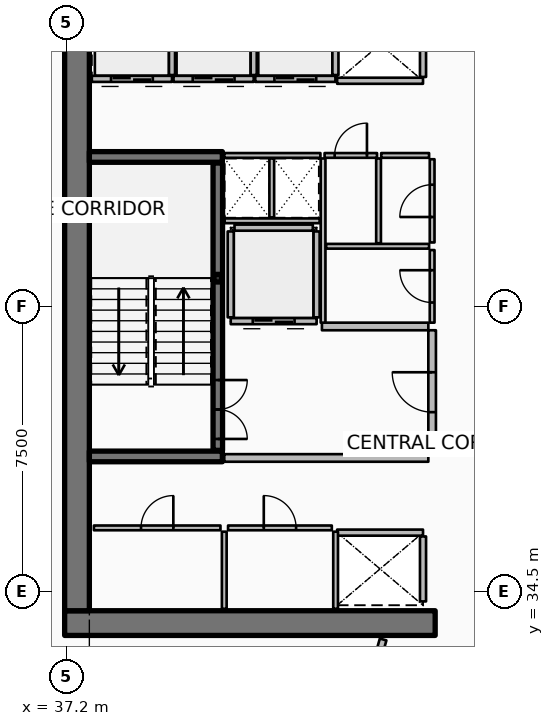
"""IFC4 building model, lengths in metres.
Left out: names, types, materials, properties, quantities, classifications, styles, units other than length and angle.
Written with IfcOpenShell. Run it as: python <this file> out.ifc"""

import sys

from ifc_helpers import new_model, si_unit, direction, frame, frame_2d, origin, origin_2d, place, context, subcontext, project, spatial, rectangle, hollow_rectangle, extrude, element, fill, save


model = new_model("IFC4")
c1 = context("Model", 3, precision=1e-05, world=origin(), true_north=direction((0.0, 1.0)))
c2 = subcontext(c1, "Body", "Model", "MODEL_VIEW")
j1 = project(units=[si_unit("LENGTHUNIT", "METRE"), si_unit("PLANEANGLEUNIT", "RADIAN")], contexts=[c1])
p1 = place(None, origin())
s1 = spatial("IfcSite", under=j1, at=p1, CompositionType="ELEMENT")
p2 = place(p1, origin())
s2 = spatial("IfcBuilding", under=s1, at=p2, CompositionType="ELEMENT")
p3 = place(p2, frame((0.0, 0.0, 180.3)))
s3 = spatial("IfcBuildingStorey", under=s2, at=p3, CompositionType="ELEMENT", Elevation=180.3)
p4 = place(p3, frame((37.15, 33.675, 0.0), z_axis=(0.0, 0.0, 1.0), x_axis=(1.0, 0.0, 0.0)))
e1 = element("IfcWall", 1, at=p4, inside=s3, PredefinedType="SHEAR", context=c2, shape_type="SweptSolid", body=[
    extrude(rectangle(XDim=9.75, YDim=0.65, at=frame_2d((4.875, 0.0))), origin(), (0.0, 0.0, 1.0), 3.75),
])
p5 = place(p3, frame((37.475, 34.0, 0.0), z_axis=(0.0, 0.0, 1.0), x_axis=(0.0, 1.0, 0.0)))
e2 = element("IfcWall", 2, at=p5, inside=s3, PredefinedType="SHEAR", context=c2, shape_type="SweptSolid", body=[
    extrude(rectangle(XDim=16.0, YDim=0.65, at=frame_2d((8.0, 0.0))), origin(), (0.0, 0.0, 1.0), 3.75),
])
for number, where, z_axis, x_axis in (
    (3, (37.8, 38.06, 0.0), (0.0, 0.0, 1.0), (1.0, 0.0, 0.0)),
    (4, (37.8, 45.94, 0.0), (0.0, 0.0, 1.0), (1.0, 0.0, 0.0)),
):
    element("IfcWall", number, at=place(p3, frame(where, z_axis=z_axis, x_axis=x_axis)), inside=s3, PredefinedType="SHEAR", context=c2, shape_type="SweptSolid", body=[
        extrude(rectangle(XDim=3.5, YDim=0.28, at=frame_2d((1.75, 0.0))), origin(), (0.0, 0.0, 1.0), 3.75),
    ])
p6 = place(p3, frame((41.18, 42.75, 0.0), z_axis=(0.0, 0.0, 1.0), x_axis=(1.0, 0.0, 0.0)))
e5 = element("IfcColumn", 5, at=p6, inside=s3, PredefinedType="COLUMN", context=c2, shape_type="SweptSolid", body=[
    extrude(hollow_rectangle(XDim=0.2, YDim=0.2, WallThickness=0.01, InnerFilletRadius=0.01, OuterFilletRadius=0.02, at=origin_2d()), origin(), (0.0, 0.0, 1.0), 1.67),
])
p7 = place(p3, frame((41.18, 38.22, 0.0), z_axis=(0.0, 0.0, 1.0), x_axis=(0.0, 1.0, 0.0)))
e6 = element("IfcWall", 6, at=p7, inside=s3, PredefinedType="SOLIDWALL", context=c2, shape_type="SweptSolid", body=[
    extrude(rectangle(XDim=7.56, YDim=0.25, at=frame_2d((3.78, 0.0))), origin(), (0.0, 0.0, 1.0), 3.5),
])
p8 = place(p7, frame((0.3, 0.0, 0.0)))
e7 = element("IfcOpeningElement", 7, at=p8, cuts=e6, PredefinedType="OPENING", context=c2, shape_type="SweptSolid", body=[
    extrude(rectangle(XDim=1.55, YDim=2.15, at=frame_2d((0.775, 1.075))), frame((0.0, 0.135, 0.0), z_axis=(0.0, -1.0, 0.0), x_axis=(1.0, 0.0, 0.0)), (0.0, 0.0, 1.0), 0.27),
])
p9 = place(p3, frame((39.975, 47.995, 0.0), z_axis=(0.0, 0.0, 1.0), x_axis=(-1.0, 0.0, 0.0)))
e8 = element("IfcWall", 8, at=p9, inside=s3, PredefinedType="PARTITIONING", context=c2, shape_type="SweptSolid", body=[
    extrude(rectangle(XDim=2.11, YDim=0.16, at=frame_2d((1.055, 0.0))), origin(), (0.0, 0.0, 1.0), 3.5),
])
p10 = place(p9, frame((0.505, 0.0, 0.0)))
e9 = element("IfcOpeningElement", 9, at=p10, cuts=e8, PredefinedType="OPENING", context=c2, shape_type="SweptSolid", body=[
    extrude(rectangle(XDim=1.1, YDim=2.1, at=frame_2d((0.55, 1.05))), frame((0.0, 0.09, 0.0), z_axis=(0.0, -1.0, 0.0), x_axis=(1.0, 0.0, 0.0)), (0.0, 0.0, 1.0), 0.18),
])
p11 = place(p3, frame((39.975, 48.095, 0.0), z_axis=(0.0, 0.0, 1.0), x_axis=(0.0, 1.0, 0.0)))
e10 = element("IfcWall", 10, at=p11, inside=s3, PredefinedType="PARTITIONING", context=c2, shape_type="SweptSolid", body=[
    extrude(rectangle(XDim=1.61, YDim=0.16, at=frame_2d((0.805, 0.0))), origin(), (0.0, 0.0, 1.0), 3.5),
])
p12 = place(p3, frame((42.125, 47.995, 0.0), z_axis=(0.0, 0.0, 1.0), x_axis=(-1.0, 0.0, 0.0)))
e11 = element("IfcWall", 11, at=p12, inside=s3, PredefinedType="PARTITIONING", context=c2, shape_type="SweptSolid", body=[
    extrude(rectangle(XDim=2.11, YDim=0.16, at=frame_2d((1.055, 0.0))), origin(), (0.0, 0.0, 1.0), 3.5),
])
p13 = place(p12, frame((0.505, 0.0, 0.0)))
e12 = element("IfcOpeningElement", 12, at=p13, cuts=e11, PredefinedType="OPENING", context=c2, shape_type="SweptSolid", body=[
    extrude(rectangle(XDim=1.1, YDim=2.1, at=frame_2d((0.55, 1.05))), frame((0.0, 0.09, 0.0), z_axis=(0.0, -1.0, 0.0), x_axis=(1.0, 0.0, 0.0)), (0.0, 0.0, 1.0), 0.18),
])
p14 = place(p3, frame((42.125, 48.095, 0.0), z_axis=(0.0, 0.0, 1.0), x_axis=(0.0, 1.0, 0.0)))
e13 = element("IfcWall", 13, at=p14, inside=s3, PredefinedType="PARTITIONING", context=c2, shape_type="SweptSolid", body=[
    extrude(rectangle(XDim=1.61, YDim=0.16, at=frame_2d((0.805, 0.0))), origin(), (0.0, 0.0, 1.0), 3.5),
])
p15 = place(p3, frame((44.275, 47.995, 0.0), z_axis=(0.0, 0.0, 1.0), x_axis=(-1.0, 0.0, 0.0)))
e14 = element("IfcWall", 14, at=p15, inside=s3, PredefinedType="PARTITIONING", context=c2, shape_type="SweptSolid", body=[
    extrude(rectangle(XDim=2.11, YDim=0.16, at=frame_2d((1.055, 0.0))), origin(), (0.0, 0.0, 1.0), 3.5),
])
p16 = place(p15, frame((0.505, 0.0, 0.0)))
e15 = element("IfcOpeningElement", 15, at=p16, cuts=e14, PredefinedType="OPENING", context=c2, shape_type="SweptSolid", body=[
    extrude(rectangle(XDim=1.1, YDim=2.1, at=frame_2d((0.55, 1.05))), frame((0.0, 0.09, 0.0), z_axis=(0.0, -1.0, 0.0), x_axis=(1.0, 0.0, 0.0)), (0.0, 0.0, 1.0), 0.18),
])
p17 = place(p3, frame((44.275, 48.095, 0.0), z_axis=(0.0, 0.0, 1.0), x_axis=(0.0, 1.0, 0.0)))
e16 = element("IfcWall", 16, at=p17, inside=s3, PredefinedType="PARTITIONING", context=c2, shape_type="SweptSolid", body=[
    extrude(rectangle(XDim=1.61, YDim=0.16, at=frame_2d((0.805, 0.0))), origin(), (0.0, 0.0, 1.0), 3.5),
])
p18 = place(p3, frame((46.58, 47.945, 0.0), z_axis=(0.0, 0.0, 1.0), x_axis=(-1.0, 0.0, 0.0)))
e17 = element("IfcWall", 17, at=p18, inside=s3, PredefinedType="PARTITIONING", context=c2, shape_type="SweptSolid", body=[
    extrude(rectangle(XDim=2.26, YDim=0.16, at=frame_2d((1.13, 0.0))), origin(), (0.0, 0.0, 1.0), 3.5),
])
p19 = place(p3, frame((46.58, 48.045, 0.0), z_axis=(0.0, 0.0, 1.0), x_axis=(0.0, 1.0, 0.0)))
e18 = element("IfcWall", 18, at=p19, inside=s3, PredefinedType="PARTITIONING", context=c2, shape_type="SweptSolid", body=[
    extrude(rectangle(XDim=1.71, YDim=0.16, at=frame_2d((0.855, 0.0))), origin(), (0.0, 0.0, 1.0), 3.5),
])
p20 = place(p3, frame((44.32, 36.055, 0.0), z_axis=(0.0, 0.0, 1.0), x_axis=(1.0, 0.0, 0.0)))
e19 = element("IfcWall", 19, at=p20, inside=s3, PredefinedType="PARTITIONING", context=c2, shape_type="SweptSolid", body=[
    extrude(rectangle(XDim=2.26, YDim=0.16, at=frame_2d((1.13, 0.0))), origin(), (0.0, 0.0, 1.0), 3.5),
])
p21 = place(p3, frame((46.58, 34.245, 0.0), z_axis=(0.0, 0.0, 1.0), x_axis=(0.0, 1.0, 0.0)))
e20 = element("IfcWall", 20, at=p21, inside=s3, PredefinedType="PARTITIONING", context=c2, shape_type="SweptSolid", body=[
    extrude(rectangle(XDim=1.71, YDim=0.16, at=frame_2d((0.855, 0.0))), origin(), (0.0, 0.0, 1.0), 3.5),
])
p22 = place(p3, frame((43.78, 41.62, 0.0), z_axis=(0.0, 0.0, 1.0), x_axis=(-1.0, 0.0, 0.0)))
e21 = element("IfcWall", 21, at=p22, inside=s3, PredefinedType="PARTITIONING", context=c2, shape_type="SweptSolid", body=[
    extrude(rectangle(XDim=2.26, YDim=0.16, at=frame_2d((1.13, 0.0))), origin(), (0.0, 0.0, 1.0), 3.5),
])
p23 = place(p22, frame((0.58, 0.0, 0.0)))
e22 = element("IfcOpeningElement", 22, at=p23, cuts=e21, PredefinedType="OPENING", context=c2, shape_type="SweptSolid", body=[
    extrude(rectangle(XDim=1.1, YDim=2.1, at=frame_2d((0.55, 1.05))), frame((0.0, 0.09, 0.0), z_axis=(0.0, -1.0, 0.0), x_axis=(1.0, 0.0, 0.0)), (0.0, 0.0, 1.0), 0.18),
])
for number, where, z_axis, x_axis in (
    (23, (43.78, 41.72, 0.0), (0.0, 0.0, 1.0), (0.0, 1.0, 0.0)),
    (24, (41.52, 41.72, 0.0), (0.0, 0.0, 1.0), (0.0, 1.0, 0.0)),
):
    element("IfcWall", number, at=place(p3, frame(where, z_axis=z_axis, x_axis=x_axis)), inside=s3, PredefinedType="PARTITIONING", context=c2, shape_type="SweptSolid", body=[
        extrude(rectangle(XDim=2.26, YDim=0.16, at=frame_2d((1.13, 0.0))), origin(), (0.0, 0.0, 1.0), 3.5),
    ])
p24 = place(p3, frame((41.62, 44.08, 0.0), z_axis=(0.0, 0.0, 1.0), x_axis=(1.0, 0.0, 0.0)))
e25 = element("IfcWall", 25, at=p24, inside=s3, PredefinedType="PARTITIONING", context=c2, shape_type="SweptSolid", body=[
    extrude(rectangle(XDim=2.06, YDim=0.16, at=frame_2d((1.03, 0.0))), origin(), (0.0, 0.0, 1.0), 3.5),
])
for number, where, z_axis, x_axis in (
    (26, (44.28, 34.05, 0.0), (0.0, 0.0, 1.0), (0.0, 1.0, 0.0)),
    (27, (41.35, 34.05, 0.0), (0.0, 0.0, 1.0), (0.0, 1.0, 0.0)),
):
    element("IfcWall", number, at=place(p3, frame(where, z_axis=z_axis, x_axis=x_axis)), inside=s3, PredefinedType="PARTITIONING", context=c2, shape_type="SweptSolid", body=[
        extrude(rectangle(XDim=2.03, YDim=0.125, at=frame_2d((1.015, 0.0))), origin(), (0.0, 0.0, 1.0), 2.94),
    ])
p25 = place(p3, frame((37.92, 36.18, 0.0), z_axis=(0.0, 0.0, 1.0), x_axis=(1.0, 0.0, 0.0)))
e28 = element("IfcWall", 28, at=p25, inside=s3, PredefinedType="PARTITIONING", context=c2, shape_type="SweptSolid", body=[
    extrude(rectangle(XDim=3.33, YDim=0.125, at=frame_2d((1.665, 0.0))), origin(), (0.0, 0.0, 1.0), 2.94),
])
p26 = place(p25, frame((1.24, 0.0, 0.0)))
e29 = element("IfcOpeningElement", 29, at=p26, cuts=e28, PredefinedType="OPENING", context=c2, shape_type="SweptSolid", body=[
    extrude(rectangle(XDim=0.85, YDim=2.06, at=frame_2d((0.425, 1.03))), frame((0.0, 0.073, 0.0), z_axis=(0.0, -1.0, 0.0), x_axis=(1.0, 0.0, 0.0)), (0.0, 0.0, 1.0), 0.145),
])
p27 = place(p3, frame((41.45, 36.18, 0.0), z_axis=(0.0, 0.0, 1.0), x_axis=(1.0, 0.0, 0.0)))
e30 = element("IfcWall", 30, at=p27, inside=s3, PredefinedType="PARTITIONING", context=c2, shape_type="SweptSolid", body=[
    extrude(rectangle(XDim=2.73, YDim=0.125, at=frame_2d((1.365, 0.0))), origin(), (0.0, 0.0, 1.0), 2.94),
])
p28 = place(p27, frame((0.94, 0.0, 0.0)))
e31 = element("IfcOpeningElement", 31, at=p28, cuts=e30, PredefinedType="OPENING", context=c2, shape_type="SweptSolid", body=[
    extrude(rectangle(XDim=0.85, YDim=2.06, at=frame_2d((0.425, 1.03))), frame((0.0, 0.073, 0.0), z_axis=(0.0, -1.0, 0.0), x_axis=(1.0, 0.0, 0.0)), (0.0, 0.0, 1.0), 0.145),
])
p29 = place(p3, frame((41.35, 38.02, 0.0), z_axis=(0.0, 0.0, 1.0), x_axis=(1.0, 0.0, 0.0)))
e32 = element("IfcWall", 32, at=p29, inside=s3, PredefinedType="PARTITIONING", context=c2, shape_type="SweptSolid", body=[
    extrude(rectangle(XDim=5.37, YDim=0.2, at=frame_2d((2.685, 0.0))), origin(), (0.0, 0.0, 1.0), 3.5),
])
p30 = place(p3, frame((43.92, 41.48, 0.0), z_axis=(0.0, 0.0, 1.0), x_axis=(1.0, 0.0, 0.0)))
e33 = element("IfcWall", 33, at=p30, inside=s3, PredefinedType="PARTITIONING", context=c2, shape_type="SweptSolid", body=[
    extrude(rectangle(XDim=2.8, YDim=0.2, at=frame_2d((1.4, 0.0))), origin(), (0.0, 0.0, 1.0), 3.5),
])
p31 = place(p3, frame((46.82, 38.12, 0.0), z_axis=(0.0, 0.0, 1.0), x_axis=(0.0, 1.0, 0.0)))
e34 = element("IfcWall", 34, at=p31, inside=s3, PredefinedType="PARTITIONING", context=c2, shape_type="SweptSolid", body=[
    extrude(rectangle(XDim=3.26, YDim=0.2, at=frame_2d((1.63, 0.0))), origin(), (0.0, 0.0, 1.0), 3.5),
])
p32 = place(p31, frame((1.105, 0.0, 0.0)))
e35 = element("IfcOpeningElement", 35, at=p32, cuts=e34, PredefinedType="OPENING", context=c2, shape_type="SweptSolid", body=[
    extrude(rectangle(XDim=1.05, YDim=2.1, at=frame_2d((0.525, 1.05))), frame((0.0, 0.11, 0.0), z_axis=(0.0, -1.0, 0.0), x_axis=(1.0, 0.0, 0.0)), (0.0, 0.0, 1.0), 0.22),
])
p33 = place(p3, frame((41.36, 44.26, 0.0), z_axis=(0.0, 0.0, 1.0), x_axis=(1.0, 0.0, 0.0)))
e36 = element("IfcWall", 36, at=p33, inside=s3, PredefinedType="PARTITIONING", context=c2, shape_type="SweptSolid", body=[
    extrude(rectangle(XDim=2.5, YDim=0.125, at=frame_2d((1.25, 0.0))), origin(), (0.0, 0.0, 1.0), 2.94),
])
p34 = place(p3, frame((42.6, 44.35, 0.0), z_axis=(0.0, 0.0, 1.0), x_axis=(0.0, 1.0, 0.0)))
e37 = element("IfcWall", 37, at=p34, inside=s3, PredefinedType="PARTITIONING", context=c2, shape_type="SweptSolid", body=[
    extrude(rectangle(XDim=1.55, YDim=0.125, at=frame_2d((0.775, 0.0))), origin(), (0.0, 0.0, 1.0), 2.94),
])
p35 = place(p3, frame((43.95, 41.58, 0.0), z_axis=(0.0, 0.0, 1.0), x_axis=(0.0, 1.0, 0.0)))
e38 = element("IfcWall", 38, at=p35, inside=s3, PredefinedType="PARTITIONING", context=c2, shape_type="SweptSolid", body=[
    extrude(rectangle(XDim=4.32, YDim=0.125, at=frame_2d((2.16, 0.0))), origin(), (0.0, 0.0, 1.0), 2.94),
])
p36 = place(p3, frame((44.03, 43.59, 0.0), z_axis=(0.0, 0.0, 1.0), x_axis=(1.0, 0.0, 0.0)))
e39 = element("IfcWall", 39, at=p36, inside=s3, PredefinedType="PARTITIONING", context=c2, shape_type="SweptSolid", body=[
    extrude(rectangle(XDim=2.71, YDim=0.125, at=frame_2d((1.355, 0.0))), origin(), (0.0, 0.0, 1.0), 2.94),
])
p37 = place(p3, frame((45.41, 43.67, 0.0), z_axis=(0.0, 0.0, 1.0), x_axis=(0.0, 1.0, 0.0)))
e40 = element("IfcWall", 40, at=p37, inside=s3, PredefinedType="PARTITIONING", context=c2, shape_type="SweptSolid", body=[
    extrude(rectangle(XDim=2.23, YDim=0.125, at=frame_2d((1.115, 0.0))), origin(), (0.0, 0.0, 1.0), 2.94),
])
p38 = place(p3, frame((46.82, 41.58, 0.0), z_axis=(0.0, 0.0, 1.0), x_axis=(0.0, 1.0, 0.0)))
e41 = element("IfcWall", 41, at=p38, inside=s3, PredefinedType="PARTITIONING", context=c2, shape_type="SweptSolid", body=[
    extrude(rectangle(XDim=1.91, YDim=0.125, at=frame_2d((0.955, 0.0))), origin(), (0.0, 0.0, 1.0), 2.94),
])
p39 = place(p38, frame((0.53, 0.0, 0.0)))
e42 = element("IfcOpeningElement", 42, at=p39, cuts=e41, PredefinedType="OPENING", context=c2, shape_type="SweptSolid", body=[
    extrude(rectangle(XDim=0.85, YDim=2.06, at=frame_2d((0.425, 1.03))), frame((0.0, 0.073, 0.0), z_axis=(0.0, -1.0, 0.0), x_axis=(1.0, 0.0, 0.0)), (0.0, 0.0, 1.0), 0.145),
])
p40 = place(p3, frame((46.82, 43.69, 0.0), z_axis=(0.0, 0.0, 1.0), x_axis=(0.0, 1.0, 0.0)))
e43 = element("IfcWall", 43, at=p40, inside=s3, PredefinedType="PARTITIONING", context=c2, shape_type="SweptSolid", body=[
    extrude(rectangle(XDim=2.19, YDim=0.125, at=frame_2d((1.095, 0.0))), origin(), (0.0, 0.0, 1.0), 2.94),
])
p41 = place(p40, frame((0.67, 0.0, 0.0)))
e44 = element("IfcOpeningElement", 44, at=p41, cuts=e43, PredefinedType="OPENING", context=c2, shape_type="SweptSolid", body=[
    extrude(rectangle(XDim=0.85, YDim=2.06, at=frame_2d((0.425, 1.03))), frame((0.0, 0.073, 0.0), z_axis=(0.0, -1.0, 0.0), x_axis=(1.0, 0.0, 0.0)), (0.0, 0.0, 1.0), 0.145),
])
p42 = place(p3, frame((41.35, 45.98, 0.0), z_axis=(0.0, 0.0, 1.0), x_axis=(1.0, 0.0, 0.0)))
e45 = element("IfcWall", 45, at=p42, inside=s3, PredefinedType="PARTITIONING", context=c2, shape_type="SweptSolid", body=[
    extrude(rectangle(XDim=2.53, YDim=0.125, at=frame_2d((1.265, 0.0))), origin(), (0.0, 0.0, 1.0), 2.94),
])
p43 = place(p3, frame((43.99, 45.98, 0.0), z_axis=(0.0, 0.0, 1.0), x_axis=(1.0, 0.0, 0.0)))
e46 = element("IfcWall", 46, at=p43, inside=s3, PredefinedType="PARTITIONING", context=c2, shape_type="SweptSolid", body=[
    extrude(rectangle(XDim=1.38, YDim=0.125, at=frame_2d((0.69, 0.0))), origin(), (0.0, 0.0, 1.0), 2.94),
])
p44 = place(p43, frame((0.265, 0.0, 0.0)))
e47 = element("IfcOpeningElement", 47, at=p44, cuts=e46, PredefinedType="OPENING", context=c2, shape_type="SweptSolid", body=[
    extrude(rectangle(XDim=0.85, YDim=2.06, at=frame_2d((0.425, 1.03))), frame((0.0, 0.073, 0.0), z_axis=(0.0, -1.0, 0.0), x_axis=(1.0, 0.0, 0.0)), (0.0, 0.0, 1.0), 0.145),
])
p45 = place(p3, frame((45.48, 45.98, 0.0), z_axis=(0.0, 0.0, 1.0), x_axis=(1.0, 0.0, 0.0)))
e48 = element("IfcWall", 48, at=p45, inside=s3, PredefinedType="PARTITIONING", context=c2, shape_type="SweptSolid", body=[
    extrude(rectangle(XDim=1.26, YDim=0.125, at=frame_2d((0.63, 0.0))), origin(), (0.0, 0.0, 1.0), 2.94),
])
p46 = place(p3, frame((45.531, 33.244, 0.0), z_axis=(0.0, 0.0, 1.0), x_axis=(-0.271437162306, -0.962456163635, 0.0)))
e49 = element("IfcWall", 49, at=p46, inside=s3, PredefinedType="PARTITIONING", context=c2, shape_type="SweptSolid", body=[
    extrude(rectangle(XDim=15.63, YDim=0.18, at=frame_2d((7.815, 0.0))), origin(), (0.0, 0.0, 1.0), 2.94),
])
p47 = place(p8, origin())
e50 = element("IfcDoor", 50, at=p47, inside=s3, OperationType="DOUBLE_DOOR_SINGLE_SWING", PredefinedType="DOOR", context=c2, shape_type="SweptSolid", body=[
    extrude(rectangle(XDim=1.55, YDim=2.15, at=frame_2d((0.775, 1.075))), frame((0.0, 0.025, 0.0), z_axis=(0.0, -1.0, 0.0), x_axis=(1.0, 0.0, 0.0)), (0.0, 0.0, 1.0), 0.05),
])
fill(e7, e50)
p48 = place(p10, origin())
e51 = element("IfcDoor", 51, at=p48, inside=s3, OperationType="DOUBLE_DOOR_SLIDING", PredefinedType="DOOR", context=c2, shape_type="SweptSolid", body=[
    extrude(rectangle(XDim=1.1, YDim=2.1, at=frame_2d((0.55, 1.05))), frame((0.0, 0.025, 0.0), z_axis=(0.0, -1.0, 0.0), x_axis=(1.0, 0.0, 0.0)), (0.0, 0.0, 1.0), 0.05),
])
fill(e9, e51)
p49 = place(p13, origin())
e52 = element("IfcDoor", 52, at=p49, inside=s3, OperationType="DOUBLE_DOOR_SLIDING", PredefinedType="DOOR", context=c2, shape_type="SweptSolid", body=[
    extrude(rectangle(XDim=1.1, YDim=2.1, at=frame_2d((0.55, 1.05))), frame((0.0, 0.025, 0.0), z_axis=(0.0, -1.0, 0.0), x_axis=(1.0, 0.0, 0.0)), (0.0, 0.0, 1.0), 0.05),
])
fill(e12, e52)
p50 = place(p16, origin())
e53 = element("IfcDoor", 53, at=p50, inside=s3, OperationType="DOUBLE_DOOR_SLIDING", PredefinedType="DOOR", context=c2, shape_type="SweptSolid", body=[
    extrude(rectangle(XDim=1.1, YDim=2.1, at=frame_2d((0.55, 1.05))), frame((0.0, 0.025, 0.0), z_axis=(0.0, -1.0, 0.0), x_axis=(1.0, 0.0, 0.0)), (0.0, 0.0, 1.0), 0.05),
])
fill(e15, e53)
p51 = place(p23, origin())
e54 = element("IfcDoor", 54, at=p51, inside=s3, OperationType="DOUBLE_DOOR_SLIDING", PredefinedType="DOOR", context=c2, shape_type="SweptSolid", body=[
    extrude(rectangle(XDim=1.1, YDim=2.1, at=frame_2d((0.55, 1.05))), frame((0.0, 0.025, 0.0), z_axis=(0.0, -1.0, 0.0), x_axis=(1.0, 0.0, 0.0)), (0.0, 0.0, 1.0), 0.05),
])
fill(e22, e54)
p52 = place(p26, origin())
e55 = element("IfcDoor", 55, at=p52, inside=s3, OperationType="SINGLE_SWING_RIGHT", PredefinedType="DOOR", context=c2, shape_type="SweptSolid", body=[
    extrude(rectangle(XDim=0.85, YDim=2.06, at=frame_2d((0.425, 1.03))), frame((0.0, 0.025, 0.0), z_axis=(0.0, -1.0, 0.0), x_axis=(1.0, 0.0, 0.0)), (0.0, 0.0, 1.0), 0.05),
])
fill(e29, e55)
p53 = place(p28, origin())
e56 = element("IfcDoor", 56, at=p53, inside=s3, OperationType="SINGLE_SWING_LEFT", PredefinedType="DOOR", context=c2, shape_type="SweptSolid", body=[
    extrude(rectangle(XDim=0.85, YDim=2.06, at=frame_2d((0.425, 1.03))), frame((0.0, 0.025, 0.0), z_axis=(0.0, -1.0, 0.0), x_axis=(1.0, 0.0, 0.0)), (0.0, 0.0, 1.0), 0.05),
])
fill(e31, e56)
p54 = place(p32, origin())
e57 = element("IfcDoor", 57, at=p54, inside=s3, OperationType="SINGLE_SWING_RIGHT", PredefinedType="DOOR", context=c2, shape_type="SweptSolid", body=[
    extrude(rectangle(XDim=1.05, YDim=2.1, at=frame_2d((0.525, 1.05))), frame((0.0, 0.025, 0.0), z_axis=(0.0, -1.0, 0.0), x_axis=(1.0, 0.0, 0.0)), (0.0, 0.0, 1.0), 0.05),
])
fill(e35, e57)
p55 = place(p39, origin())
e58 = element("IfcDoor", 58, at=p55, inside=s3, OperationType="SINGLE_SWING_RIGHT", PredefinedType="DOOR", context=c2, shape_type="SweptSolid", body=[
    extrude(rectangle(XDim=0.85, YDim=2.06, at=frame_2d((0.425, 1.03))), frame((0.0, 0.025, 0.0), z_axis=(0.0, -1.0, 0.0), x_axis=(1.0, 0.0, 0.0)), (0.0, 0.0, 1.0), 0.05),
])
fill(e42, e58)
p56 = place(p41, origin())
e59 = element("IfcDoor", 59, at=p56, inside=s3, OperationType="SINGLE_SWING_LEFT", PredefinedType="DOOR", context=c2, shape_type="SweptSolid", body=[
    extrude(rectangle(XDim=0.85, YDim=2.06, at=frame_2d((0.425, 1.03))), frame((0.0, 0.025, 0.0), z_axis=(0.0, -1.0, 0.0), x_axis=(1.0, 0.0, 0.0)), (0.0, 0.0, 1.0), 0.05),
])
fill(e44, e59)
p57 = place(p44, origin())
e60 = element("IfcDoor", 60, at=p57, inside=s3, OperationType="SINGLE_SWING_RIGHT", PredefinedType="DOOR", context=c2, shape_type="SweptSolid", body=[
    extrude(rectangle(XDim=0.85, YDim=2.06, at=frame_2d((0.425, 1.03))), frame((0.0, 0.025, 0.0), z_axis=(0.0, -1.0, 0.0), x_axis=(1.0, 0.0, 0.0)), (0.0, 0.0, 1.0), 0.05),
])
fill(e47, e60)
save(model, sys.argv[1])
